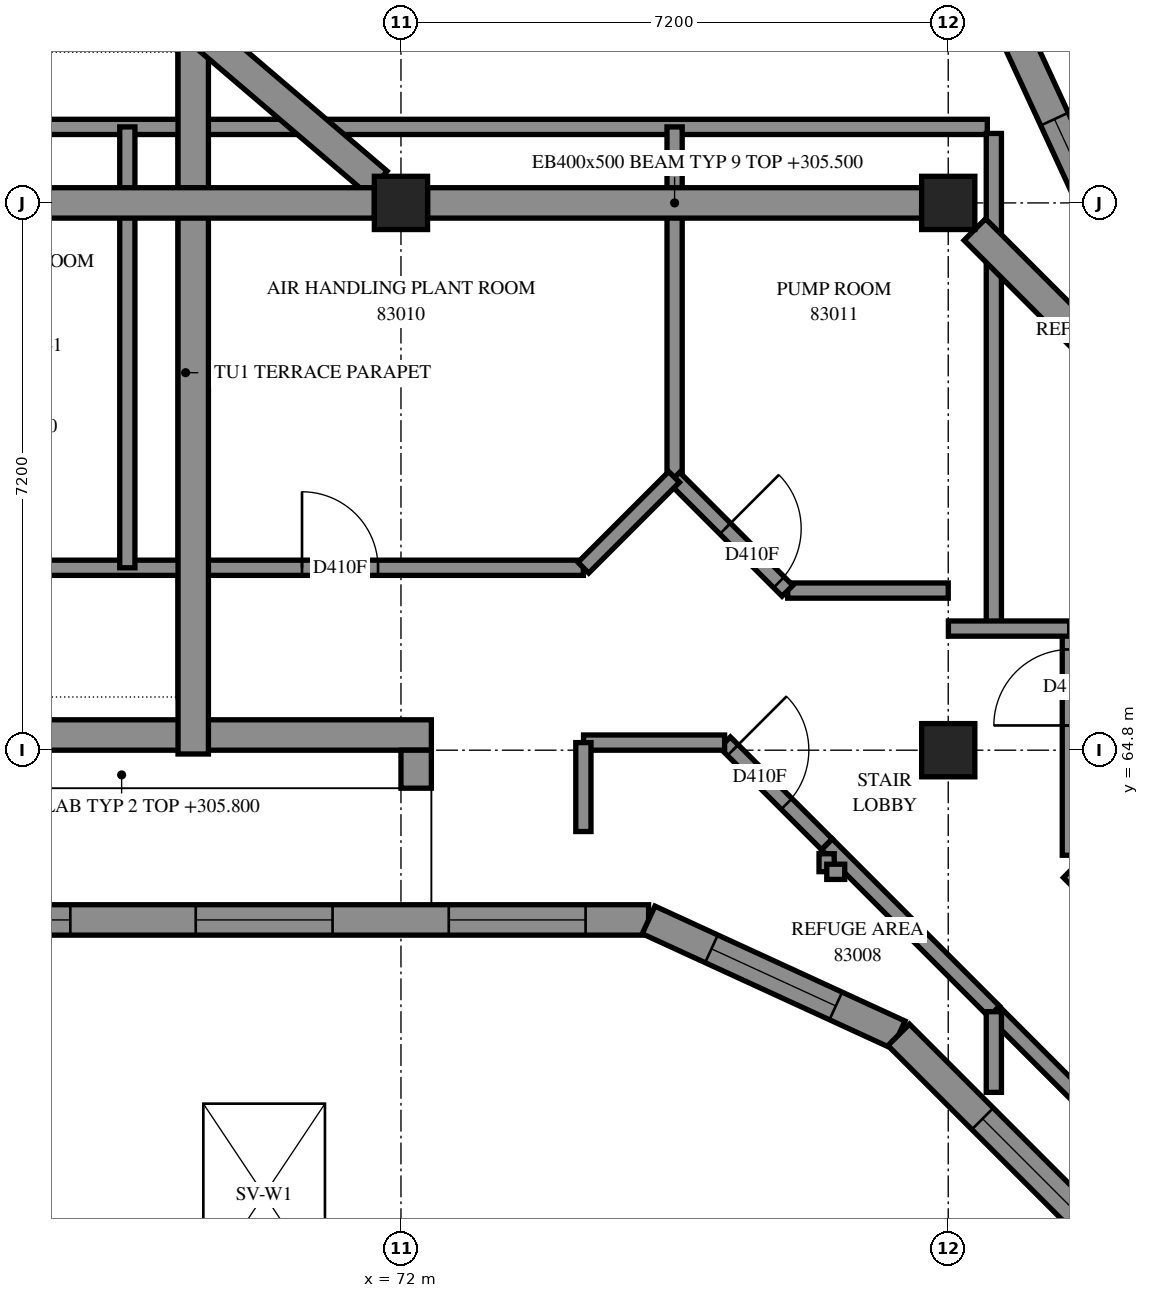
"""IFC4 building model, lengths in metres.
Left out: names, types, materials, properties, quantities, classifications, styles, units other than length and angle.
Written with IfcOpenShell. Run it as: python <this file> out.ifc"""

import sys

from ifc_helpers import new_model, si_unit, direction, frame, frame_2d, origin, origin_2d, place, context, subcontext, project, spatial, polyline, rectangle, outline, extrude, element, fill, save


model = new_model("IFC4")
c1 = context("Model", 3, precision=1e-05, world=origin(), true_north=direction((0.0, 1.0)))
c2 = subcontext(c1, "Body", "Model", "MODEL_VIEW")
j1 = project(units=[si_unit("LENGTHUNIT", "METRE"), si_unit("PLANEANGLEUNIT", "RADIAN")], contexts=[c1])
p1 = place(None, origin())
s1 = spatial("IfcSite", under=j1, at=p1, CompositionType="ELEMENT")
p2 = place(p1, origin())
s2 = spatial("IfcBuilding", under=s1, at=p2, CompositionType="ELEMENT")
p3 = place(p2, frame((0.0, 0.0, 305.8)))
s3 = spatial("IfcBuildingStorey", under=s2, at=p3, CompositionType="ELEMENT", Elevation=305.8)
for number, where, z_axis, x_axis in (
    (1, (72.0, 72.0, 0.0), (0.0, 0.0, 1.0), (1.0, 0.0, 0.0)),
    (2, (79.2, 64.8, 0.0), (0.0, 0.0, 1.0), (1.0, 0.0, 0.0)),
    (3, (79.2, 72.0, 0.0), (0.0, 0.0, 1.0), (1.0, 0.0, 0.0)),
):
    element("IfcColumn", number, at=place(p3, frame(where, z_axis=z_axis, x_axis=x_axis)), inside=s3, PredefinedType="COLUMN", context=c2, shape_type="SweptSolid", body=[
        extrude(rectangle(XDim=0.7, YDim=0.7, at=origin_2d()), origin(), (0.0, 0.0, 1.0), 3.5),
    ])
p4 = place(p3, frame((64.3, 65.0, -0.3), z_axis=(0.0, 0.0, 1.0), x_axis=(1.0, 0.0, 0.0)))
e4 = element("IfcWall", 4, at=p4, inside=s3, PredefinedType="SHEAR", context=c2, shape_type="SweptSolid", body=[
    extrude(outline(polyline([(0.0, 0.0), (8.1, 0.0), (8.1, 3.1), (0.0, 3.1), (0.0, 0.0)])), frame((0.0, 0.2, 0.0), z_axis=(0.0, -1.0, 0.0), x_axis=(1.0, 0.0, 0.0)), (0.0, 0.0, 1.0), 0.4),
])
p5 = place(p3, frame((72.2, 64.3, -0.3), z_axis=(0.0, 0.0, 1.0), x_axis=(0.0, 1.0, 0.0)))
e5 = element("IfcWall", 5, at=p5, inside=s3, PredefinedType="SHEAR", context=c2, shape_type="SweptSolid", body=[
    extrude(outline(polyline([(0.0, 0.0), (0.5, 0.0), (0.5, 3.1), (0.0, 3.1), (0.0, 0.0)])), frame((0.0, 0.2, 0.0), z_axis=(0.0, -1.0, 0.0), x_axis=(1.0, 0.0, 0.0)), (0.0, 0.0, 1.0), 0.4),
])
p6 = place(p3, frame((81.53, 71.085, 0.0), z_axis=(0.0, 0.0, 1.0), x_axis=(-0.4192593081, 0.9078665279, 0.0)))
e6 = element("IfcWall", 6, at=p6, inside=s3, PredefinedType="SOLIDWALL", context=c2, shape_type="SweptSolid", body=[
    extrude(outline(polyline([(0.036, -0.2), (3.596, -0.2), (3.34, 0.2), (-0.036, 0.2), (0.036, -0.2)])), origin(), (0.0, 0.0, 1.0), 3.5),
])
p7 = place(p6, frame((0.423, 0.0, 0.7)))
e7 = element("IfcOpeningElement", 7, at=p7, cuts=e6, PredefinedType="OPENING", context=c2, shape_type="SweptSolid", body=[
    extrude(rectangle(XDim=1.8, YDim=2.2, at=frame_2d((0.9, 1.1))), frame((0.0, 0.21, 0.0), z_axis=(0.0, -1.0, 0.0), x_axis=(1.0, 0.0, 0.0)), (0.0, 0.0, 1.0), 0.42),
])
p8 = place(p3, frame((62.567, 62.567, 0.0), z_axis=(0.0, 0.0, 1.0), x_axis=(1.0, 0.0, 0.0)))
e8 = element("IfcWall", 8, at=p8, inside=s3, PredefinedType="SOLIDWALL", context=c2, shape_type="SweptSolid", body=[
    extrude(outline(polyline([(-0.2, -0.2), (12.647, -0.2), (12.735, 0.2), (0.2, 0.2), (-0.2, -0.2)])), origin(), (0.0, 0.0, 1.0), 3.5),
])
p9 = place(p8, frame((3.283, 0.0, 0.7)))
e9 = element("IfcOpeningElement", 9, at=p9, cuts=e8, PredefinedType="OPENING", context=c2, shape_type="SweptSolid", body=[
    extrude(rectangle(XDim=1.8, YDim=2.2, at=frame_2d((0.9, 1.1))), frame((0.0, 0.21, 0.0), z_axis=(0.0, -1.0, 0.0), x_axis=(1.0, 0.0, 0.0)), (0.0, 0.0, 1.0), 0.42),
])
p10 = place(p8, frame((6.733, 0.0, 0.7)))
e10 = element("IfcOpeningElement", 10, at=p10, cuts=e8, PredefinedType="OPENING", context=c2, shape_type="SweptSolid", body=[
    extrude(rectangle(XDim=1.8, YDim=2.2, at=frame_2d((0.9, 1.1))), frame((0.0, 0.21, 0.0), z_axis=(0.0, -1.0, 0.0), x_axis=(1.0, 0.0, 0.0)), (0.0, 0.0, 1.0), 0.42),
])
p11 = place(p8, frame((10.062, 0.0, 0.7)))
e11 = element("IfcOpeningElement", 11, at=p11, cuts=e8, PredefinedType="OPENING", context=c2, shape_type="SweptSolid", body=[
    extrude(rectangle(XDim=1.8, YDim=2.2, at=frame_2d((0.9, 1.1))), frame((0.0, 0.21, 0.0), z_axis=(0.0, -1.0, 0.0), x_axis=(1.0, 0.0, 0.0)), (0.0, 0.0, 1.0), 0.42),
])
p12 = place(p3, frame((75.258, 62.567, 0.0), z_axis=(0.0, 0.0, 1.0), x_axis=(0.9086839234, -0.417484763, 0.0)))
e12 = element("IfcWall", 12, at=p12, inside=s3, PredefinedType="SOLIDWALL", context=c2, shape_type="SweptSolid", body=[
    extrude(outline(polyline([(0.044, -0.2), (3.585, -0.2), (3.657, 0.2), (-0.044, 0.2), (0.044, -0.2)])), origin(), (0.0, 0.0, 1.0), 3.5),
])
p13 = place(p12, frame((0.91, 0.0, 0.7)))
e13 = element("IfcOpeningElement", 13, at=p13, cuts=e12, PredefinedType="OPENING", context=c2, shape_type="SweptSolid", body=[
    extrude(rectangle(XDim=1.8, YDim=2.2, at=frame_2d((0.9, 1.1))), frame((0.0, 0.21, 0.0), z_axis=(0.0, -1.0, 0.0), x_axis=(1.0, 0.0, 0.0)), (0.0, 0.0, 1.0), 0.42),
])
p14 = place(p3, frame((78.548, 61.055, 0.0), z_axis=(0.0, 0.0, 1.0), x_axis=(0.7071067812, -0.7071067812, 0.0)))
e14 = element("IfcWall", 14, at=p14, inside=s3, PredefinedType="SOLIDWALL", context=c2, shape_type="SweptSolid", body=[
    extrude(outline(polyline([(0.036, -0.2), (6.677, -0.2), (6.677, 0.2), (-0.036, 0.2), (0.036, -0.2)])), origin(), (0.0, 0.0, 1.0), 3.5),
])
p15 = place(p14, frame((1.561, 0.0, 0.7)))
e15 = element("IfcOpeningElement", 15, at=p15, cuts=e14, PredefinedType="OPENING", context=c2, shape_type="SweptSolid", body=[
    extrude(rectangle(XDim=1.8, YDim=2.2, at=frame_2d((0.9, 1.1))), frame((0.0, 0.21, 0.0), z_axis=(0.0, -1.0, 0.0), x_axis=(1.0, 0.0, 0.0)), (0.0, 0.0, 1.0), 0.42),
])
p16 = place(p3, frame((69.167, 65.5, 0.0), z_axis=(0.0, 0.0, 1.0), x_axis=(0.0, 1.0, 0.0)))
e16 = element("IfcWall", 16, at=p16, inside=s3, PredefinedType="PARAPET", context=c2, shape_type="SweptSolid", body=[
    extrude(outline(polyline([(0.0, -0.1), (8.533, -0.1), (8.533, 0.1), (0.0, 0.1), (0.0, -0.1)])), origin(), (0.0, 0.0, 1.0), 0.25),
])
p17 = place(p3, frame((62.767, 73.0, 0.0), z_axis=(0.0, 0.0, 1.0), x_axis=(1.0, 0.0, 0.0)))
e17 = element("IfcWall", 17, at=p17, inside=s3, PredefinedType="PARTITIONING", context=c2, shape_type="SweptSolid", body=[
    extrude(rectangle(XDim=16.947, YDim=0.2, at=frame_2d((8.473, 0.0))), origin(), (0.0, 0.0, 1.0), 3.5),
])
p18 = place(p3, frame((62.767, 67.2, 0.0), z_axis=(0.0, 0.0, 1.0), x_axis=(1.0, 0.0, 0.0)))
e18 = element("IfcWall", 18, at=p18, inside=s3, PredefinedType="PARTITIONING", context=c2, shape_type="SweptSolid", body=[
    extrude(rectangle(XDim=11.633, YDim=0.2, at=frame_2d((5.816, 0.0))), origin(), (0.0, 0.0, 1.0), 3.5),
])
p19 = place(p18, frame((3.519, 0.0, 0.0)))
e19 = element("IfcOpeningElement", 19, at=p19, cuts=e18, PredefinedType="OPENING", context=c2, shape_type="SweptSolid", body=[
    extrude(rectangle(XDim=1.0, YDim=2.1, at=frame_2d((0.5, 1.05))), frame((0.0, 0.11, 0.0), z_axis=(0.0, -1.0, 0.0), x_axis=(1.0, 0.0, 0.0)), (0.0, 0.0, 1.0), 0.22),
])
p20 = place(p18, frame((7.931, 0.0, 0.0)))
e20 = element("IfcOpeningElement", 20, at=p20, cuts=e18, PredefinedType="OPENING", context=c2, shape_type="SweptSolid", body=[
    extrude(rectangle(XDim=1.0, YDim=2.1, at=frame_2d((0.5, 1.05))), frame((0.0, 0.11, 0.0), z_axis=(0.0, -1.0, 0.0), x_axis=(1.0, 0.0, 0.0)), (0.0, 0.0, 1.0), 0.22),
])
p21 = place(p3, frame((79.8, 66.4, 0.0), z_axis=(0.0, 0.0, 1.0), x_axis=(0.0, 1.0, 0.0)))
e21 = element("IfcWall", 21, at=p21, inside=s3, PredefinedType="PARTITIONING", context=c2, shape_type="SweptSolid", body=[
    extrude(rectangle(XDim=6.514, YDim=0.2, at=frame_2d((3.257, 0.0))), origin(), (0.0, 0.0, 1.0), 3.5),
])
p22 = place(p3, frame((68.4, 67.2, 0.0), z_axis=(0.0, 0.0, 1.0), x_axis=(0.0, 1.0, 0.0)))
e22 = element("IfcWall", 22, at=p22, inside=s3, PredefinedType="PARTITIONING", context=c2, shape_type="SweptSolid", body=[
    extrude(rectangle(XDim=5.8, YDim=0.2, at=frame_2d((2.9, 0.0))), origin(), (0.0, 0.0, 1.0), 3.5),
])
p23 = place(p3, frame((80.787, 63.194, 0.0), z_axis=(0.0, 0.0, 1.0), x_axis=(0.7071067812, -0.7071067812, 0.0)))
e23 = element("IfcWall", 23, at=p23, inside=s3, PredefinedType="PARTITIONING", context=c2, shape_type="SweptSolid", body=[
    extrude(rectangle(XDim=4.65, YDim=0.2, at=frame_2d((2.325, 0.0))), origin(), (0.0, 0.0, 1.0), 3.5),
])
p24 = place(p23, frame((1.939, 0.0, 0.0)))
e24 = element("IfcOpeningElement", 24, at=p24, cuts=e23, PredefinedType="OPENING", context=c2, shape_type="SweptSolid", body=[
    extrude(rectangle(XDim=1.0, YDim=2.1, at=frame_2d((0.5, 1.05))), frame((0.0, 0.11, 0.0), z_axis=(0.0, -1.0, 0.0), x_axis=(1.0, 0.0, 0.0)), (0.0, 0.0, 1.0), 0.22),
])
p25 = place(p3, frame((75.6, 68.388, 0.0), z_axis=(0.0, 0.0, 1.0), x_axis=(0.0, 1.0, 0.0)))
e25 = element("IfcWall", 25, at=p25, inside=s3, PredefinedType="PARTITIONING", context=c2, shape_type="SweptSolid", body=[
    extrude(rectangle(XDim=4.612, YDim=0.2, at=frame_2d((2.306, 0.0))), origin(), (0.0, 0.0, 1.0), 3.5),
])
p26 = place(p3, frame((80.801, 63.417, 0.0), z_axis=(0.0, 0.0, 1.0), x_axis=(0.70732766, 0.7068858333, 0.0)))
e26 = element("IfcWall", 26, at=p26, inside=s3, PredefinedType="PARTITIONING", context=c2, shape_type="SweptSolid", body=[
    extrude(rectangle(XDim=5.432, YDim=0.2, at=frame_2d((2.716, 0.0))), origin(), (0.0, 0.0, 1.0), 3.5),
])
p27 = place(p3, frame((79.8, 61.36, 0.0), z_axis=(0.0, 0.0, 1.0), x_axis=(0.7068599295, -0.7073535467, 0.0)))
e27 = element("IfcWall", 27, at=p27, inside=s3, PredefinedType="PARTITIONING", context=c2, shape_type="SweptSolid", body=[
    extrude(rectangle(XDim=4.052, YDim=0.2, at=frame_2d((2.026, 0.0))), origin(), (0.0, 0.0, 1.0), 3.5),
])
p28 = place(p3, frame((80.8, 63.418, 0.0), z_axis=(0.0, 0.0, 1.0), x_axis=(0.0, 1.0, 0.0)))
e28 = element("IfcWall", 28, at=p28, inside=s3, PredefinedType="PARTITIONING", context=c2, shape_type="SweptSolid", body=[
    extrude(rectangle(XDim=2.98, YDim=0.2, at=frame_2d((1.49, 0.0))), origin(), (0.0, 0.0, 1.0), 3.5),
])
p29 = place(p28, frame((1.708, 0.0, 0.0)))
e29 = element("IfcOpeningElement", 29, at=p29, cuts=e28, PredefinedType="OPENING", context=c2, shape_type="SweptSolid", body=[
    extrude(rectangle(XDim=1.0, YDim=2.1, at=frame_2d((0.5, 1.05))), frame((0.0, 0.11, 0.0), z_axis=(0.0, -1.0, 0.0), x_axis=(1.0, 0.0, 0.0)), (0.0, 0.0, 1.0), 0.22),
])
p30 = place(p3, frame((77.603, 63.563, 0.0), z_axis=(0.0, 0.0, 1.0), x_axis=(0.7071067812, -0.7071067812, 0.0)))
e30 = element("IfcWall", 30, at=p30, inside=s3, PredefinedType="PARTITIONING", context=c2, shape_type="SweptSolid", body=[
    extrude(rectangle(XDim=3.111, YDim=0.2, at=frame_2d((1.556, 0.0))), origin(), (0.0, 0.0, 1.0), 3.5),
])
p31 = place(p3, frame((77.088, 66.9, 0.0), z_axis=(0.0, 0.0, 1.0), x_axis=(1.0, 0.0, 0.0)))
e31 = element("IfcWall", 31, at=p31, inside=s3, PredefinedType="PARTITIONING", context=c2, shape_type="SweptSolid", body=[
    extrude(rectangle(XDim=2.112, YDim=0.2, at=frame_2d((1.056, 0.0))), origin(), (0.0, 0.0, 1.0), 3.5),
])
p32 = place(p3, frame((75.597, 68.385, 0.0), z_axis=(0.0, 0.0, 1.0), x_axis=(0.7071067812, -0.7071067812, 0.0)))
e32 = element("IfcWall", 32, at=p32, inside=s3, PredefinedType="PARTITIONING", context=c2, shape_type="SweptSolid", body=[
    extrude(rectangle(XDim=2.104, YDim=0.2, at=frame_2d((1.052, 0.0))), origin(), (0.0, 0.0, 1.0), 3.5),
])
p33 = place(p32, frame((0.946, 0.0, 0.0)))
e33 = element("IfcOpeningElement", 33, at=p33, cuts=e32, PredefinedType="OPENING", context=c2, shape_type="SweptSolid", body=[
    extrude(rectangle(XDim=1.0, YDim=2.1, at=frame_2d((0.5, 1.05))), frame((0.0, 0.11, 0.0), z_axis=(0.0, -1.0, 0.0), x_axis=(1.0, 0.0, 0.0)), (0.0, 0.0, 1.0), 0.22),
])
p34 = place(p3, frame((76.263, 64.903, 0.0), z_axis=(0.0, 0.0, 1.0), x_axis=(0.7071067812, -0.7071067812, 0.0)))
e34 = element("IfcWall", 34, at=p34, inside=s3, PredefinedType="PARTITIONING", context=c2, shape_type="SweptSolid", body=[
    extrude(rectangle(XDim=1.895, YDim=0.2, at=frame_2d((0.948, 0.0))), origin(), (0.0, 0.0, 1.0), 3.5),
])
p35 = place(p34, frame((0.145, 0.0, 0.0)))
e35 = element("IfcOpeningElement", 35, at=p35, cuts=e34, PredefinedType="OPENING", context=c2, shape_type="SweptSolid", body=[
    extrude(rectangle(XDim=1.0, YDim=2.1, at=frame_2d((0.5, 1.05))), frame((0.0, 0.11, 0.0), z_axis=(0.0, -1.0, 0.0), x_axis=(1.0, 0.0, 0.0)), (0.0, 0.0, 1.0), 0.22),
])
p36 = place(p3, frame((74.402, 64.9, 0.0), z_axis=(0.0, 0.0, 1.0), x_axis=(1.0, 0.0, 0.0)))
e36 = element("IfcWall", 36, at=p36, inside=s3, PredefinedType="PARTITIONING", context=c2, shape_type="SweptSolid", body=[
    extrude(rectangle(XDim=1.856, YDim=0.2, at=frame_2d((0.928, 0.0))), origin(), (0.0, 0.0, 1.0), 3.5),
])
p37 = place(p3, frame((74.399, 67.201, 0.0), z_axis=(0.0, 0.0, 1.0), x_axis=(0.7071067812, 0.7071067812, 0.0)))
e37 = element("IfcWall", 37, at=p37, inside=s3, PredefinedType="PARTITIONING", context=c2, shape_type="SweptSolid", body=[
    extrude(rectangle(XDim=1.689, YDim=0.2, at=frame_2d((0.844, 0.0))), origin(), (0.0, 0.0, 1.0), 3.5),
])
p38 = place(p3, frame((79.8, 60.298, 0.0), z_axis=(0.0, 0.0, 1.0), x_axis=(0.0, 1.0, 0.0)))
e38 = element("IfcWall", 38, at=p38, inside=s3, PredefinedType="PARTITIONING", context=c2, shape_type="SweptSolid", body=[
    extrude(rectangle(XDim=1.062, YDim=0.2, at=frame_2d((0.531, 0.0))), origin(), (0.0, 0.0, 1.0), 3.5),
])
p39 = place(p3, frame((79.202, 66.4, 0.0), z_axis=(0.0, 0.0, 1.0), x_axis=(1.0, 0.0, 0.0)))
e39 = element("IfcWall", 39, at=p39, inside=s3, PredefinedType="PARTITIONING", context=c2, shape_type="SweptSolid", body=[
    extrude(rectangle(XDim=1.596, YDim=0.2, at=frame_2d((0.798, 0.0))), origin(), (0.0, 0.0, 1.0), 3.5),
])
p40 = place(p3, frame((74.4, 63.73, 0.0), z_axis=(0.0, 0.0, 1.0), x_axis=(0.0, 1.0, 0.0)))
e40 = element("IfcWall", 40, at=p40, inside=s3, PredefinedType="PARTITIONING", context=c2, shape_type="SweptSolid", body=[
    extrude(rectangle(XDim=1.17, YDim=0.2, at=frame_2d((0.585, 0.0))), origin(), (0.0, 0.0, 1.0), 3.5),
])
for number, where, z_axis, x_axis in (
    (41, (77.6, 63.202, 0.0), (0.0, 0.0, 1.0), (0.0, 1.0, 0.0)),
    (42, (77.602, 63.2, 0.0), (0.0, 0.0, 1.0), (1.0, 0.0, 0.0)),
):
    element("IfcWall", number, at=place(p3, frame(where, z_axis=z_axis, x_axis=x_axis)), inside=s3, PredefinedType="PARTITIONING", context=c2, shape_type="SweptSolid", body=[
        extrude(rectangle(XDim=0.236, YDim=0.2, at=frame_2d((0.118, 0.0))), origin(), (0.0, 0.0, 1.0), 3.5),
    ])
p41 = place(p7, origin())
e43 = element("IfcWindow", 43, at=p41, inside=s3, PartitioningType="SINGLE_PANEL", PredefinedType="WINDOW", context=c2, shape_type="SweptSolid", body=[
    extrude(rectangle(XDim=1.8, YDim=2.2, at=frame_2d((0.9, 1.1))), frame((0.0, 0.08, 0.0), z_axis=(0.0, -1.0, 0.0), x_axis=(1.0, 0.0, 0.0)), (0.0, 0.0, 1.0), 0.06),
])
fill(e7, e43)
p42 = place(p9, origin())
e44 = element("IfcWindow", 44, at=p42, inside=s3, PartitioningType="SINGLE_PANEL", PredefinedType="WINDOW", context=c2, shape_type="SweptSolid", body=[
    extrude(rectangle(XDim=1.8, YDim=2.2, at=frame_2d((0.9, 1.1))), frame((0.0, 0.08, 0.0), z_axis=(0.0, -1.0, 0.0), x_axis=(1.0, 0.0, 0.0)), (0.0, 0.0, 1.0), 0.06),
])
fill(e9, e44)
p43 = place(p10, origin())
e45 = element("IfcWindow", 45, at=p43, inside=s3, PartitioningType="SINGLE_PANEL", PredefinedType="WINDOW", context=c2, shape_type="SweptSolid", body=[
    extrude(rectangle(XDim=1.8, YDim=2.2, at=frame_2d((0.9, 1.1))), frame((0.0, 0.08, 0.0), z_axis=(0.0, -1.0, 0.0), x_axis=(1.0, 0.0, 0.0)), (0.0, 0.0, 1.0), 0.06),
])
fill(e10, e45)
p44 = place(p11, origin())
e46 = element("IfcWindow", 46, at=p44, inside=s3, PartitioningType="SINGLE_PANEL", PredefinedType="WINDOW", context=c2, shape_type="SweptSolid", body=[
    extrude(rectangle(XDim=1.8, YDim=2.2, at=frame_2d((0.9, 1.1))), frame((0.0, 0.08, 0.0), z_axis=(0.0, -1.0, 0.0), x_axis=(1.0, 0.0, 0.0)), (0.0, 0.0, 1.0), 0.06),
])
fill(e11, e46)
p45 = place(p13, origin())
e47 = element("IfcWindow", 47, at=p45, inside=s3, PartitioningType="SINGLE_PANEL", PredefinedType="WINDOW", context=c2, shape_type="SweptSolid", body=[
    extrude(rectangle(XDim=1.8, YDim=2.2, at=frame_2d((0.9, 1.1))), frame((0.0, 0.08, 0.0), z_axis=(0.0, -1.0, 0.0), x_axis=(1.0, 0.0, 0.0)), (0.0, 0.0, 1.0), 0.06),
])
fill(e13, e47)
p46 = place(p15, origin())
e48 = element("IfcWindow", 48, at=p46, inside=s3, PartitioningType="SINGLE_PANEL", PredefinedType="WINDOW", context=c2, shape_type="SweptSolid", body=[
    extrude(rectangle(XDim=1.8, YDim=2.2, at=frame_2d((0.9, 1.1))), frame((0.0, 0.08, 0.0), z_axis=(0.0, -1.0, 0.0), x_axis=(1.0, 0.0, 0.0)), (0.0, 0.0, 1.0), 0.06),
])
fill(e15, e48)
p47 = place(p35, origin())
e49 = element("IfcDoor", 49, at=p47, inside=s3, OperationType="SINGLE_SWING_RIGHT", PredefinedType="DOOR", context=c2, shape_type="SweptSolid", body=[
    extrude(rectangle(XDim=1.0, YDim=2.1, at=frame_2d((0.5, 1.05))), frame((0.0, 0.025, 0.0), z_axis=(0.0, -1.0, 0.0), x_axis=(1.0, 0.0, 0.0)), (0.0, 0.0, 1.0), 0.05),
])
fill(e35, e49)
p48 = place(p20, origin())
e50 = element("IfcDoor", 50, at=p48, inside=s3, OperationType="SINGLE_SWING_LEFT", PredefinedType="DOOR", context=c2, shape_type="SweptSolid", body=[
    extrude(rectangle(XDim=1.0, YDim=2.1, at=frame_2d((0.5, 1.05))), frame((0.0, 0.025, 0.0), z_axis=(0.0, -1.0, 0.0), x_axis=(1.0, 0.0, 0.0)), (0.0, 0.0, 1.0), 0.05),
])
fill(e20, e50)
p49 = place(p33, origin())
e51 = element("IfcDoor", 51, at=p49, inside=s3, OperationType="SINGLE_SWING_LEFT", PredefinedType="DOOR", context=c2, shape_type="SweptSolid", body=[
    extrude(rectangle(XDim=1.0, YDim=2.1, at=frame_2d((0.5, 1.05))), frame((0.0, 0.025, 0.0), z_axis=(0.0, -1.0, 0.0), x_axis=(1.0, 0.0, 0.0)), (0.0, 0.0, 1.0), 0.05),
])
fill(e33, e51)
p50 = place(p29, origin())
e52 = element("IfcDoor", 52, at=p50, inside=s3, OperationType="SINGLE_SWING_RIGHT", PredefinedType="DOOR", context=c2, shape_type="SweptSolid", body=[
    extrude(rectangle(XDim=1.0, YDim=2.1, at=frame_2d((0.5, 1.05))), frame((0.0, 0.025, 0.0), z_axis=(0.0, -1.0, 0.0), x_axis=(1.0, 0.0, 0.0)), (0.0, 0.0, 1.0), 0.05),
])
fill(e29, e52)
save(model, sys.argv[1])
